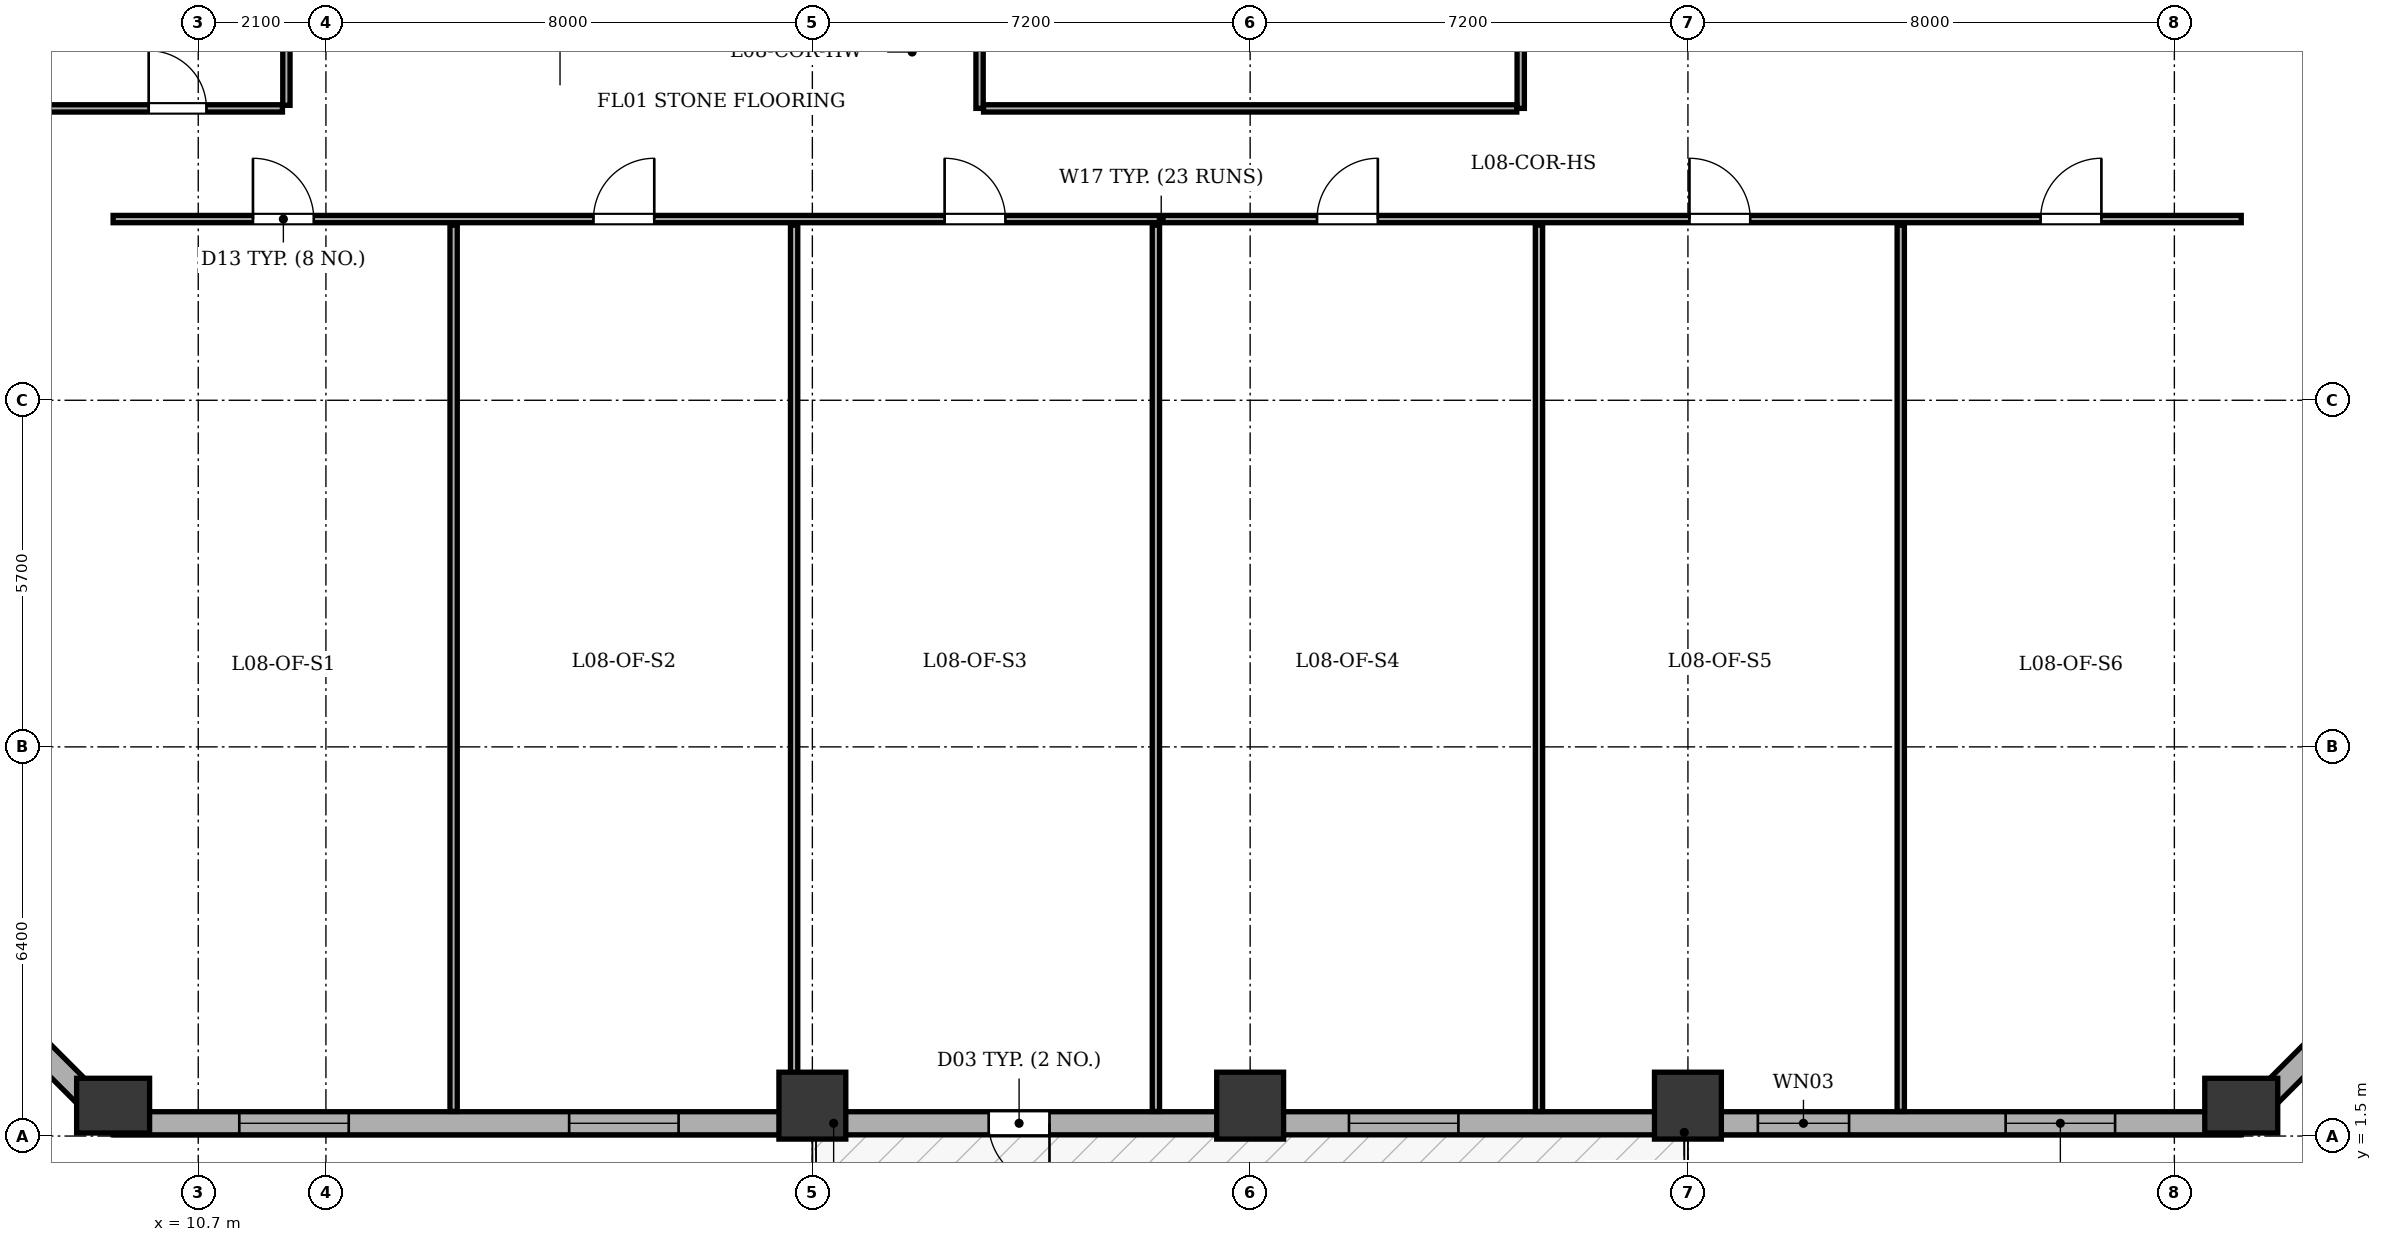
"""IFC4 building model, lengths in metres.
Left out: names, types, materials, properties, quantities, classifications, styles, units other than length and angle.
Written with IfcOpenShell. Run it as: python <this file> out.ifc"""

import sys

from ifc_helpers import new_model, si_unit, direction, frame, frame_2d, origin, origin_2d, place, context, subcontext, project, spatial, rectangle, extrude, element, fill, save


model = new_model("IFC4")
c1 = context("Model", 3, precision=1e-05, world=origin(), true_north=direction((0.0, 1.0)))
c2 = subcontext(c1, "Body", "Model", "MODEL_VIEW")
j1 = project(units=[si_unit("LENGTHUNIT", "METRE"), si_unit("PLANEANGLEUNIT", "RADIAN")], contexts=[c1])
p1 = place(None, origin())
s1 = spatial("IfcSite", under=j1, at=p1, CompositionType="ELEMENT")
p2 = place(p1, origin())
s2 = spatial("IfcBuilding", under=s1, at=p2, CompositionType="ELEMENT")
p3 = place(p2, frame((0.0, 0.0, 36.0)))
s3 = spatial("IfcBuildingStorey", under=s2, at=p3, CompositionType="ELEMENT", Elevation=36.0)
p4 = place(p3, frame((9.3, 2.0, 0.0), z_axis=(0.0, 0.0, 1.0), x_axis=(1.0, 0.0, 0.0)))
e1 = element("IfcColumn", 1, at=p4, inside=s3, PredefinedType="COLUMN", context=c2, shape_type="SweptSolid", body=[
    extrude(rectangle(XDim=0.9, YDim=1.2, at=origin_2d()), origin(), (0.0, 0.0, 1.0), 3.9),
])
for number, where, z_axis, x_axis in (
    (2, (20.8, 2.0, 0.0), (0.0, 0.0, 1.0), (1.0, 0.0, 0.0)),
    (3, (28.0, 2.0, 0.0), (0.0, 0.0, 1.0), (1.0, 0.0, 0.0)),
    (4, (35.2, 2.0, 0.0), (0.0, 0.0, 1.0), (1.0, 0.0, 0.0)),
):
    element("IfcColumn", number, at=place(p3, frame(where, z_axis=z_axis, x_axis=x_axis)), inside=s3, PredefinedType="COLUMN", context=c2, shape_type="SweptSolid", body=[
        extrude(rectangle(XDim=1.1, YDim=1.1, at=origin_2d()), origin(), (0.0, 0.0, 1.0), 3.9),
    ])
p5 = place(p3, frame((44.3, 2.0, 0.0), z_axis=(0.0, 0.0, 1.0), x_axis=(1.0, 0.0, 0.0)))
e5 = element("IfcColumn", 5, at=p5, inside=s3, PredefinedType="COLUMN", context=c2, shape_type="SweptSolid", body=[
    extrude(rectangle(XDim=0.9, YDim=1.2, at=origin_2d()), origin(), (0.0, 0.0, 1.0), 3.9),
])
p6 = place(p3, frame((44.3, 1.71, 0.0), z_axis=(0.0, 0.0, 1.0), x_axis=(-1.0, 0.0, 0.0)))
e6 = element("IfcWall", 6, at=p6, inside=s3, PredefinedType="STANDARD", context=c2, shape_type="SweptSolid", body=[
    extrude(rectangle(XDim=35.0, YDim=0.38, at=frame_2d((17.5, 0.0))), origin(), (0.0, 0.0, 1.0), 3.135),
])
p7 = place(p6, frame((19.6, 0.0, 0.0)))
e7 = element("IfcOpeningElement", 7, at=p7, cuts=e6, PredefinedType="OPENING", context=c2, shape_type="SweptSolid", body=[
    extrude(rectangle(XDim=1.0, YDim=2.02, at=frame_2d((0.5, 1.01))), frame((0.0, 0.2, 0.0), z_axis=(0.0, -1.0, 0.0), x_axis=(1.0, 0.0, 0.0)), (0.0, 0.0, 1.0), 0.4),
])
p8 = place(p6, frame((2.075, 0.0, 0.8)))
e8 = element("IfcOpeningElement", 8, at=p8, cuts=e6, PredefinedType="OPENING", context=c2, shape_type="SweptSolid", body=[
    extrude(rectangle(XDim=1.8, YDim=1.9, at=frame_2d((0.9, 0.95))), frame((0.0, 0.2, 0.0), z_axis=(0.0, -1.0, 0.0), x_axis=(1.0, 0.0, 0.0)), (0.0, 0.0, 1.0), 0.4),
])
p9 = place(p6, frame((6.45, 0.0, 0.8)))
e9 = element("IfcOpeningElement", 9, at=p9, cuts=e6, PredefinedType="OPENING", context=c2, shape_type="SweptSolid", body=[
    extrude(rectangle(XDim=1.5, YDim=1.9, at=frame_2d((0.75, 0.95))), frame((0.0, 0.2, 0.0), z_axis=(0.0, -1.0, 0.0), x_axis=(1.0, 0.0, 0.0)), (0.0, 0.0, 1.0), 0.4),
])
p10 = place(p6, frame((12.875, 0.0, 0.8)))
e10 = element("IfcOpeningElement", 10, at=p10, cuts=e6, PredefinedType="OPENING", context=c2, shape_type="SweptSolid", body=[
    extrude(rectangle(XDim=1.8, YDim=1.9, at=frame_2d((0.9, 0.95))), frame((0.0, 0.2, 0.0), z_axis=(0.0, -1.0, 0.0), x_axis=(1.0, 0.0, 0.0)), (0.0, 0.0, 1.0), 0.4),
])
p11 = place(p6, frame((25.7, 0.0, 0.8)))
e11 = element("IfcOpeningElement", 11, at=p11, cuts=e6, PredefinedType="OPENING", context=c2, shape_type="SweptSolid", body=[
    extrude(rectangle(XDim=1.8, YDim=1.9, at=frame_2d((0.9, 0.95))), frame((0.0, 0.2, 0.0), z_axis=(0.0, -1.0, 0.0), x_axis=(1.0, 0.0, 0.0)), (0.0, 0.0, 1.0), 0.4),
])
p12 = place(p6, frame((31.125, 0.0, 0.8)))
e12 = element("IfcOpeningElement", 12, at=p12, cuts=e6, PredefinedType="OPENING", context=c2, shape_type="SweptSolid", body=[
    extrude(rectangle(XDim=1.8, YDim=1.9, at=frame_2d((0.9, 0.95))), frame((0.0, 0.2, 0.0), z_axis=(0.0, -1.0, 0.0), x_axis=(1.0, 0.0, 0.0)), (0.0, 0.0, 1.0), 0.4),
])
p13 = place(p3, frame((9.3, 1.71, 0.0), z_axis=(0.0, 0.0, 1.0), x_axis=(-0.707106781187, 0.707106781187, 0.0)))
e13 = element("IfcWall", 13, at=p13, inside=s3, PredefinedType="STANDARD", context=c2, shape_type="SweptSolid", body=[
    extrude(rectangle(XDim=6.774, YDim=0.38, at=frame_2d((3.387, 0.0))), origin(), (0.0, 0.0, 1.0), 3.135),
])
p14 = place(p13, frame((2.687, 0.0, 0.8)))
e14 = element("IfcOpeningElement", 14, at=p14, cuts=e13, PredefinedType="OPENING", context=c2, shape_type="SweptSolid", body=[
    extrude(rectangle(XDim=1.4, YDim=1.65, at=frame_2d((0.7, 0.825))), frame((0.0, 0.2, 0.0), z_axis=(0.0, -1.0, 0.0), x_axis=(1.0, 0.0, 0.0)), (0.0, 0.0, 1.0), 0.4),
])
p15 = place(p3, frame((49.09, 6.5, 0.0), z_axis=(0.0, 0.0, 1.0), x_axis=(-0.707106781187, -0.707106781187, 0.0)))
e15 = element("IfcWall", 15, at=p15, inside=s3, PredefinedType="STANDARD", context=c2, shape_type="SweptSolid", body=[
    extrude(rectangle(XDim=6.774, YDim=0.38, at=frame_2d((3.387, 0.0))), origin(), (0.0, 0.0, 1.0), 3.135),
])
p16 = place(p15, frame((2.687, 0.0, 0.8)))
e16 = element("IfcOpeningElement", 16, at=p16, cuts=e15, PredefinedType="OPENING", context=c2, shape_type="SweptSolid", body=[
    extrude(rectangle(XDim=1.4, YDim=1.65, at=frame_2d((0.7, 0.825))), frame((0.0, 0.2, 0.0), z_axis=(0.0, -1.0, 0.0), x_axis=(1.0, 0.0, 0.0)), (0.0, 0.0, 1.0), 0.4),
])
for number, where, z_axis, x_axis in (
    (17, (23.55, 18.4, 0.0), (0.0, 0.0, 1.0), (0.0, 1.0, 0.0)),
    (18, (32.45, 18.4, 0.0), (0.0, 0.0, 1.0), (0.0, 1.0, 0.0)),
):
    element("IfcWall", number, at=place(p3, frame(where, z_axis=z_axis, x_axis=x_axis)), inside=s3, PredefinedType="PARTITIONING", context=c2, shape_type="SweptSolid", body=[
        extrude(rectangle(XDim=3.485, YDim=0.12, at=frame_2d((1.743, 0.0))), origin(), (0.0, 0.0, 1.0), 3.6),
    ])
p17 = place(p3, frame((23.615, 18.4, 0.0), z_axis=(0.0, 0.0, 1.0), x_axis=(1.0, 0.0, 0.0)))
e19 = element("IfcWall", 19, at=p17, inside=s3, PredefinedType="PARTITIONING", context=c2, shape_type="SweptSolid", body=[
    extrude(rectangle(XDim=8.77, YDim=0.12, at=frame_2d((4.385, 0.0))), origin(), (0.0, 0.0, 1.0), 3.6),
])
p18 = place(p3, frame((9.3, 16.58, 0.0), z_axis=(0.0, 0.0, 1.0), x_axis=(1.0, 0.0, 0.0)))
e20 = element("IfcWall", 20, at=p18, inside=s3, PredefinedType="PARTITIONING", context=c2, shape_type="SweptSolid", body=[
    extrude(rectangle(XDim=35.0, YDim=0.12, at=frame_2d((17.5, 0.0))), origin(), (0.0, 0.0, 1.0), 3.6),
])
p19 = place(p18, frame((2.3, 0.0, 0.0)))
e21 = element("IfcOpeningElement", 21, at=p19, cuts=e20, PredefinedType="OPENING", context=c2, shape_type="SweptSolid", body=[
    extrude(rectangle(XDim=1.0, YDim=2.1, at=frame_2d((0.5, 1.05))), frame((0.0, 0.07, 0.0), z_axis=(0.0, -1.0, 0.0), x_axis=(1.0, 0.0, 0.0)), (0.0, 0.0, 1.0), 0.14),
])
p20 = place(p18, frame((7.9, 0.0, 0.0)))
e22 = element("IfcOpeningElement", 22, at=p20, cuts=e20, PredefinedType="OPENING", context=c2, shape_type="SweptSolid", body=[
    extrude(rectangle(XDim=1.0, YDim=2.1, at=frame_2d((0.5, 1.05))), frame((0.0, 0.07, 0.0), z_axis=(0.0, -1.0, 0.0), x_axis=(1.0, 0.0, 0.0)), (0.0, 0.0, 1.0), 0.14),
])
p21 = place(p18, frame((13.675, 0.0, 0.0)))
e23 = element("IfcOpeningElement", 23, at=p21, cuts=e20, PredefinedType="OPENING", context=c2, shape_type="SweptSolid", body=[
    extrude(rectangle(XDim=1.0, YDim=2.1, at=frame_2d((0.5, 1.05))), frame((0.0, 0.07, 0.0), z_axis=(0.0, -1.0, 0.0), x_axis=(1.0, 0.0, 0.0)), (0.0, 0.0, 1.0), 0.14),
])
p22 = place(p18, frame((19.8, 0.0, 0.0)))
e24 = element("IfcOpeningElement", 24, at=p22, cuts=e20, PredefinedType="OPENING", context=c2, shape_type="SweptSolid", body=[
    extrude(rectangle(XDim=1.0, YDim=2.1, at=frame_2d((0.5, 1.05))), frame((0.0, 0.07, 0.0), z_axis=(0.0, -1.0, 0.0), x_axis=(1.0, 0.0, 0.0)), (0.0, 0.0, 1.0), 0.14),
])
p23 = place(p18, frame((25.925, 0.0, 0.0)))
e25 = element("IfcOpeningElement", 25, at=p23, cuts=e20, PredefinedType="OPENING", context=c2, shape_type="SweptSolid", body=[
    extrude(rectangle(XDim=1.0, YDim=2.1, at=frame_2d((0.5, 1.05))), frame((0.0, 0.07, 0.0), z_axis=(0.0, -1.0, 0.0), x_axis=(1.0, 0.0, 0.0)), (0.0, 0.0, 1.0), 0.14),
])
p24 = place(p18, frame((31.7, 0.0, 0.0)))
e26 = element("IfcOpeningElement", 26, at=p24, cuts=e20, PredefinedType="OPENING", context=c2, shape_type="SweptSolid", body=[
    extrude(rectangle(XDim=1.0, YDim=2.1, at=frame_2d((0.5, 1.05))), frame((0.0, 0.07, 0.0), z_axis=(0.0, -1.0, 0.0), x_axis=(1.0, 0.0, 0.0)), (0.0, 0.0, 1.0), 0.14),
])
p25 = place(p3, frame((14.9, 1.905, 0.0), z_axis=(0.0, 0.0, 1.0), x_axis=(0.0, 1.0, 0.0)))
e27 = element("IfcWall", 27, at=p25, inside=s3, PredefinedType="PARTITIONING", context=c2, shape_type="SweptSolid", body=[
    extrude(rectangle(XDim=14.575, YDim=0.12, at=frame_2d((7.288, 0.0))), origin(), (0.0, 0.0, 1.0), 3.6),
])
p26 = place(p3, frame((20.5, 1.905, 0.0), z_axis=(0.0, 0.0, 1.0), x_axis=(0.0, 1.0, 0.0)))
e28 = element("IfcWall", 28, at=p26, inside=s3, PredefinedType="PARTITIONING", context=c2, shape_type="SweptSolid", body=[
    extrude(rectangle(XDim=14.575, YDim=0.12, at=frame_2d((7.288, 0.0))), origin(), (0.0, 0.0, 1.0), 2.835),
])
for number, where, z_axis, x_axis in (
    (29, (26.45, 1.905, 0.0), (0.0, 0.0, 1.0), (0.0, 1.0, 0.0)),
    (30, (32.75, 1.905, 0.0), (0.0, 0.0, 1.0), (0.0, 1.0, 0.0)),
    (31, (38.7, 1.905, 0.0), (0.0, 0.0, 1.0), (0.0, 1.0, 0.0)),
):
    element("IfcWall", number, at=place(p3, frame(where, z_axis=z_axis, x_axis=x_axis)), inside=s3, PredefinedType="PARTITIONING", context=c2, shape_type="SweptSolid", body=[
        extrude(rectangle(XDim=14.575, YDim=0.12, at=frame_2d((7.288, 0.0))), origin(), (0.0, 0.0, 1.0), 3.6),
    ])
p27 = place(p3, frame((12.15, 18.45, 0.0), z_axis=(0.0, 0.0, 1.0), x_axis=(0.0, 1.0, 0.0)))
e32 = element("IfcWall", 32, at=p27, inside=s3, PredefinedType="PARTITIONING", context=c2, shape_type="SweptSolid", body=[
    extrude(rectangle(XDim=17.5, YDim=0.12, at=frame_2d((8.75, 0.0))), origin(), (0.0, 0.0, 1.0), 3.6),
])
p28 = place(p3, frame((4.705, 18.4, 0.0), z_axis=(0.0, 0.0, 1.0), x_axis=(1.0, 0.0, 0.0)))
e33 = element("IfcWall", 33, at=p28, inside=s3, PredefinedType="PARTITIONING", context=c2, shape_type="SweptSolid", body=[
    extrude(rectangle(XDim=7.38, YDim=0.12, at=frame_2d((3.69, 0.0))), origin(), (0.0, 0.0, 1.0), 3.6),
])
p29 = place(p28, frame((5.18, 0.0, 0.0)))
e34 = element("IfcOpeningElement", 34, at=p29, cuts=e33, PredefinedType="OPENING", context=c2, shape_type="SweptSolid", body=[
    extrude(rectangle(XDim=0.95, YDim=2.1, at=frame_2d((0.475, 1.05))), frame((0.0, 0.07, 0.0), z_axis=(0.0, -1.0, 0.0), x_axis=(1.0, 0.0, 0.0)), (0.0, 0.0, 1.0), 0.14),
])
p30 = place(p7, origin())
e35 = element("IfcDoor", 35, at=p30, inside=s3, OperationType="SINGLE_SWING_LEFT", PredefinedType="DOOR", context=c2, shape_type="SweptSolid", body=[
    extrude(rectangle(XDim=1.0, YDim=2.02, at=frame_2d((0.5, 1.01))), frame((0.0, 0.025, 0.0), z_axis=(0.0, -1.0, 0.0), x_axis=(1.0, 0.0, 0.0)), (0.0, 0.0, 1.0), 0.05),
])
fill(e7, e35)
p31 = place(p8, origin())
e36 = element("IfcWindow", 36, at=p31, inside=s3, PartitioningType="SINGLE_PANEL", PredefinedType="WINDOW", context=c2, shape_type="SweptSolid", body=[
    extrude(rectangle(XDim=1.8, YDim=1.9, at=frame_2d((0.9, 0.95))), frame((0.0, -0.01, 0.0), z_axis=(0.0, -1.0, 0.0), x_axis=(1.0, 0.0, 0.0)), (0.0, 0.0, 1.0), 0.06),
])
fill(e8, e36)
p32 = place(p9, origin())
e37 = element("IfcWindow", 37, at=p32, inside=s3, PartitioningType="SINGLE_PANEL", PredefinedType="WINDOW", context=c2, shape_type="SweptSolid", body=[
    extrude(rectangle(XDim=1.5, YDim=1.9, at=frame_2d((0.75, 0.95))), frame((0.0, -0.01, 0.0), z_axis=(0.0, -1.0, 0.0), x_axis=(1.0, 0.0, 0.0)), (0.0, 0.0, 1.0), 0.06),
])
fill(e9, e37)
p33 = place(p10, origin())
e38 = element("IfcWindow", 38, at=p33, inside=s3, PartitioningType="SINGLE_PANEL", PredefinedType="WINDOW", context=c2, shape_type="SweptSolid", body=[
    extrude(rectangle(XDim=1.8, YDim=1.9, at=frame_2d((0.9, 0.95))), frame((0.0, -0.01, 0.0), z_axis=(0.0, -1.0, 0.0), x_axis=(1.0, 0.0, 0.0)), (0.0, 0.0, 1.0), 0.06),
])
fill(e10, e38)
p34 = place(p11, origin())
e39 = element("IfcWindow", 39, at=p34, inside=s3, PartitioningType="SINGLE_PANEL", PredefinedType="WINDOW", context=c2, shape_type="SweptSolid", body=[
    extrude(rectangle(XDim=1.8, YDim=1.9, at=frame_2d((0.9, 0.95))), frame((0.0, -0.01, 0.0), z_axis=(0.0, -1.0, 0.0), x_axis=(1.0, 0.0, 0.0)), (0.0, 0.0, 1.0), 0.06),
])
fill(e11, e39)
p35 = place(p12, origin())
e40 = element("IfcWindow", 40, at=p35, inside=s3, PartitioningType="SINGLE_PANEL", PredefinedType="WINDOW", context=c2, shape_type="SweptSolid", body=[
    extrude(rectangle(XDim=1.8, YDim=1.9, at=frame_2d((0.9, 0.95))), frame((0.0, -0.01, 0.0), z_axis=(0.0, -1.0, 0.0), x_axis=(1.0, 0.0, 0.0)), (0.0, 0.0, 1.0), 0.06),
])
fill(e12, e40)
p36 = place(p19, origin())
e41 = element("IfcDoor", 41, at=p36, inside=s3, OperationType="SINGLE_SWING_LEFT", PredefinedType="DOOR", context=c2, shape_type="SweptSolid", body=[
    extrude(rectangle(XDim=1.0, YDim=2.1, at=frame_2d((0.5, 1.05))), frame((0.0, 0.025, 0.0), z_axis=(0.0, -1.0, 0.0), x_axis=(1.0, 0.0, 0.0)), (0.0, 0.0, 1.0), 0.05),
])
fill(e21, e41)
p37 = place(p20, origin())
e42 = element("IfcDoor", 42, at=p37, inside=s3, OperationType="SINGLE_SWING_RIGHT", PredefinedType="DOOR", context=c2, shape_type="SweptSolid", body=[
    extrude(rectangle(XDim=1.0, YDim=2.1, at=frame_2d((0.5, 1.05))), frame((0.0, 0.025, 0.0), z_axis=(0.0, -1.0, 0.0), x_axis=(1.0, 0.0, 0.0)), (0.0, 0.0, 1.0), 0.05),
])
fill(e22, e42)
p38 = place(p21, origin())
e43 = element("IfcDoor", 43, at=p38, inside=s3, OperationType="SINGLE_SWING_LEFT", PredefinedType="DOOR", context=c2, shape_type="SweptSolid", body=[
    extrude(rectangle(XDim=1.0, YDim=2.1, at=frame_2d((0.5, 1.05))), frame((0.0, 0.025, 0.0), z_axis=(0.0, -1.0, 0.0), x_axis=(1.0, 0.0, 0.0)), (0.0, 0.0, 1.0), 0.05),
])
fill(e23, e43)
p39 = place(p22, origin())
e44 = element("IfcDoor", 44, at=p39, inside=s3, OperationType="SINGLE_SWING_RIGHT", PredefinedType="DOOR", context=c2, shape_type="SweptSolid", body=[
    extrude(rectangle(XDim=1.0, YDim=2.1, at=frame_2d((0.5, 1.05))), frame((0.0, 0.025, 0.0), z_axis=(0.0, -1.0, 0.0), x_axis=(1.0, 0.0, 0.0)), (0.0, 0.0, 1.0), 0.05),
])
fill(e24, e44)
p40 = place(p23, origin())
e45 = element("IfcDoor", 45, at=p40, inside=s3, OperationType="SINGLE_SWING_LEFT", PredefinedType="DOOR", context=c2, shape_type="SweptSolid", body=[
    extrude(rectangle(XDim=1.0, YDim=2.1, at=frame_2d((0.5, 1.05))), frame((0.0, 0.025, 0.0), z_axis=(0.0, -1.0, 0.0), x_axis=(1.0, 0.0, 0.0)), (0.0, 0.0, 1.0), 0.05),
])
fill(e25, e45)
p41 = place(p24, origin())
e46 = element("IfcDoor", 46, at=p41, inside=s3, OperationType="SINGLE_SWING_RIGHT", PredefinedType="DOOR", context=c2, shape_type="SweptSolid", body=[
    extrude(rectangle(XDim=1.0, YDim=2.1, at=frame_2d((0.5, 1.05))), frame((0.0, 0.025, 0.0), z_axis=(0.0, -1.0, 0.0), x_axis=(1.0, 0.0, 0.0)), (0.0, 0.0, 1.0), 0.05),
])
fill(e26, e46)
p42 = place(p29, origin())
e47 = element("IfcDoor", 47, at=p42, inside=s3, OperationType="SINGLE_SWING_LEFT", PredefinedType="DOOR", context=c2, shape_type="SweptSolid", body=[
    extrude(rectangle(XDim=0.95, YDim=2.1, at=frame_2d((0.475, 1.05))), frame((0.0, 0.025, 0.0), z_axis=(0.0, -1.0, 0.0), x_axis=(1.0, 0.0, 0.0)), (0.0, 0.0, 1.0), 0.05),
])
fill(e34, e47)
save(model, sys.argv[1])
